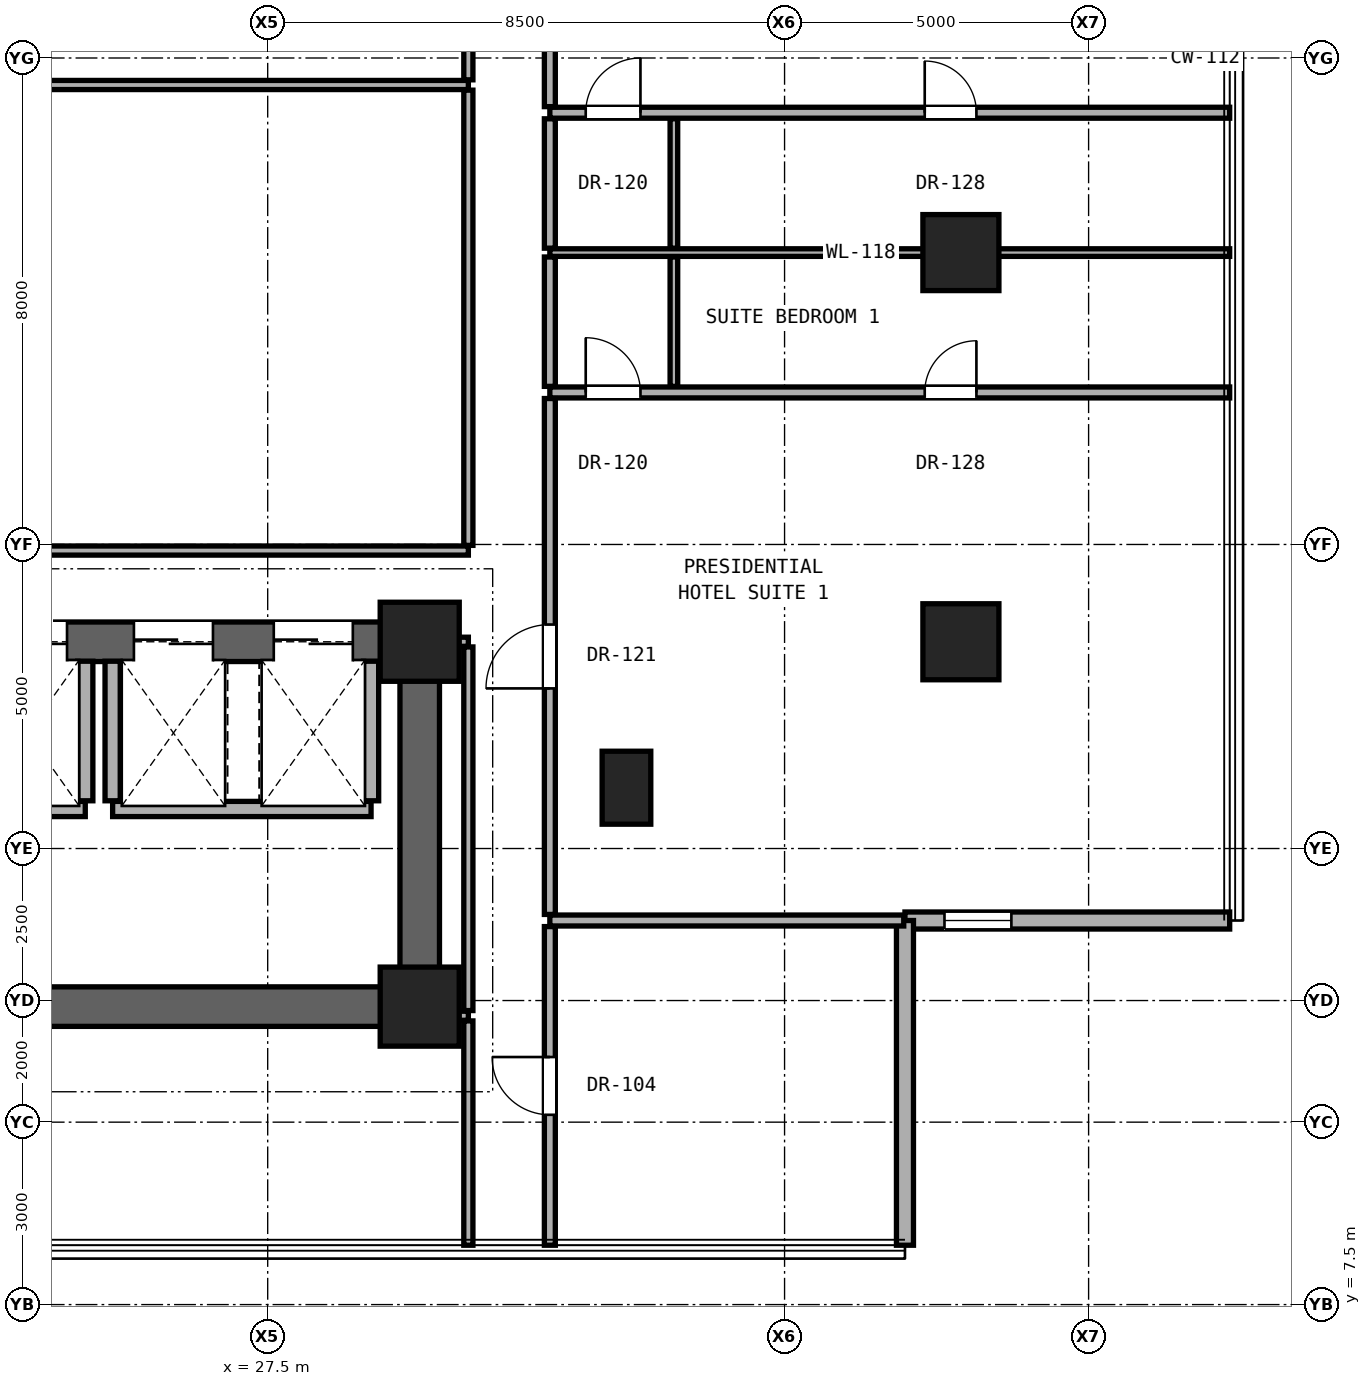
"""IFC4 building model, lengths in metres.
Left out: names, types, materials, properties, quantities, classifications, styles, units other than length and angle.
Written with IfcOpenShell. Run it as: python <this file> out.ifc"""

import sys

from ifc_helpers import new_model, si_unit, direction, frame, frame_2d, origin, origin_2d, place, context, subcontext, project, spatial, rectangle, hollow_rectangle, extrude, element, fill, save


model = new_model("IFC4")
c1 = context("Model", 3, precision=1e-05, world=origin(), true_north=direction((0.0, 1.0)))
c2 = subcontext(c1, "Body", "Model", "MODEL_VIEW")
j1 = project(units=[si_unit("LENGTHUNIT", "METRE"), si_unit("PLANEANGLEUNIT", "RADIAN")], contexts=[c1])
p1 = place(None, origin())
s1 = spatial("IfcSite", under=j1, at=p1, CompositionType="ELEMENT")
p2 = place(p1, origin())
s2 = spatial("IfcBuilding", under=s1, at=p2, CompositionType="ELEMENT")
p3 = place(p2, frame((0.0, 0.0, 78.5)))
s3 = spatial("IfcBuildingStorey", under=s2, at=p3, CompositionType="ELEMENT", Elevation=78.5)
for number, where, z_axis, x_axis in (
    (1, (30.0, 12.4, 0.0), (0.0, 0.0, 1.0), (1.0, 0.0, 0.0)),
    (2, (30.0, 18.4, 0.0), (0.0, 0.0, 1.0), (1.0, 0.0, 0.0)),
):
    element("IfcColumn", number, at=place(p3, frame(where, z_axis=z_axis, x_axis=x_axis)), inside=s3, PredefinedType="COLUMN", context=c2, shape_type="SweptSolid", body=[
        extrude(rectangle(XDim=1.3, YDim=1.3, at=origin_2d()), origin(), (0.0, 0.0, 1.0), 3.3),
    ])
for number, where, z_axis, x_axis in (
    (3, (38.9, 18.4, 0.0), (0.0, 0.0, 1.0), (1.0, 0.0, 0.0)),
    (4, (38.9, 24.8, 0.0), (0.0, 0.0, 1.0), (1.0, 0.0, 0.0)),
):
    element("IfcColumn", number, at=place(p3, frame(where, z_axis=z_axis, x_axis=x_axis)), inside=s3, PredefinedType="COLUMN", context=c2, shape_type="SweptSolid", body=[
        extrude(hollow_rectangle(XDim=1.25, YDim=1.25, WallThickness=0.07, at=origin_2d()), origin(), (0.0, 0.0, 1.0), 3.3),
    ])
p4 = place(p3, frame((33.4, 16.0, 0.0), z_axis=(0.0, 0.0, 1.0), x_axis=(1.0, 0.0, 0.0)))
e5 = element("IfcColumn", 5, at=p4, inside=s3, PredefinedType="PILASTER", context=c2, shape_type="SweptSolid", body=[
    extrude(rectangle(XDim=0.8, YDim=1.2, at=origin_2d()), origin(), (0.0, 0.0, 1.0), 3.3),
])
p5 = place(p3, frame((11.0, 12.4, 0.0), z_axis=(0.0, 0.0, 1.0), x_axis=(1.0, 0.0, 0.0)))
e6 = element("IfcWall", 6, at=p5, inside=s3, PredefinedType="SHEAR", context=c2, shape_type="SweptSolid", body=[
    extrude(rectangle(XDim=19.0, YDim=0.65, at=frame_2d((9.5, 0.0))), origin(), (0.0, 0.0, 1.0), 2.94),
])
p6 = place(p3, frame((30.0, 12.4, 0.0), z_axis=(0.0, 0.0, 1.0), x_axis=(0.0, 1.0, 0.0)))
e7 = element("IfcWall", 7, at=p6, inside=s3, PredefinedType="SHEAR", context=c2, shape_type="SweptSolid", body=[
    extrude(rectangle(XDim=6.0, YDim=0.65, at=frame_2d((3.0, 0.0))), origin(), (0.0, 0.0, 1.0), 2.94),
])
p7 = place(p3, frame((11.0, 18.4, 0.0), z_axis=(0.0, 0.0, 1.0), x_axis=(1.0, 0.0, 0.0)))
e8 = element("IfcWall", 8, at=p7, inside=s3, PredefinedType="SHEAR", context=c2, shape_type="SweptSolid", body=[
    extrude(rectangle(XDim=19.0, YDim=0.65, at=frame_2d((9.5, 0.0))), origin(), (0.0, 0.0, 1.0), 2.94),
])
p8 = place(p7, frame((4.175, 0.0, 0.0)))
e9 = element("IfcOpeningElement", 9, at=p8, cuts=e8, PredefinedType="OPENING", context=c2, shape_type="SweptSolid", body=[
    extrude(rectangle(XDim=1.2, YDim=2.25, at=frame_2d((0.6, 1.125))), frame((0.0, 0.335, 0.0), z_axis=(0.0, -1.0, 0.0), x_axis=(1.0, 0.0, 0.0)), (0.0, 0.0, 1.0), 0.67),
])
p9 = place(p7, frame((9.6, 0.0, 0.0)))
e10 = element("IfcOpeningElement", 10, at=p9, cuts=e8, PredefinedType="OPENING", context=c2, shape_type="SweptSolid", body=[
    extrude(rectangle(XDim=1.3, YDim=2.3, at=frame_2d((0.65, 1.15))), frame((0.0, 0.335, 0.0), z_axis=(0.0, -1.0, 0.0), x_axis=(1.0, 0.0, 0.0)), (0.0, 0.0, 1.0), 0.67),
])
p10 = place(p7, frame((11.9, 0.0, 0.0)))
e11 = element("IfcOpeningElement", 11, at=p10, cuts=e8, PredefinedType="OPENING", context=c2, shape_type="SweptSolid", body=[
    extrude(rectangle(XDim=1.3, YDim=2.3, at=frame_2d((0.65, 1.15))), frame((0.0, 0.335, 0.0), z_axis=(0.0, -1.0, 0.0), x_axis=(1.0, 0.0, 0.0)), (0.0, 0.0, 1.0), 0.67),
])
p11 = place(p7, frame((14.3, 0.0, 0.0)))
e12 = element("IfcOpeningElement", 12, at=p11, cuts=e8, PredefinedType="OPENING", context=c2, shape_type="SweptSolid", body=[
    extrude(rectangle(XDim=1.3, YDim=2.3, at=frame_2d((0.65, 1.15))), frame((0.0, 0.335, 0.0), z_axis=(0.0, -1.0, 0.0), x_axis=(1.0, 0.0, 0.0)), (0.0, 0.0, 1.0), 0.67),
])
p12 = place(p7, frame((16.6, 0.0, 0.0)))
e13 = element("IfcOpeningElement", 13, at=p12, cuts=e8, PredefinedType="OPENING", context=c2, shape_type="SweptSolid", body=[
    extrude(rectangle(XDim=1.3, YDim=2.3, at=frame_2d((0.65, 1.15))), frame((0.0, 0.335, 0.0), z_axis=(0.0, -1.0, 0.0), x_axis=(1.0, 0.0, 0.0)), (0.0, 0.0, 1.0), 0.67),
])
p13 = place(p3, frame((37.98, 13.816, 0.0), z_axis=(0.0, 0.0, 1.0), x_axis=(1.0, 0.0, 0.0)))
e14 = element("IfcWall", 14, at=p13, inside=s3, PredefinedType="SOLIDWALL", context=c2, shape_type="SweptSolid", body=[
    extrude(rectangle(XDim=5.34, YDim=0.28, at=frame_2d((2.67, 0.0))), origin(), (0.0, 0.0, 1.0), 2.56),
])
p14 = place(p13, frame((0.65, 0.0, 0.41)))
e15 = element("IfcOpeningElement", 15, at=p14, cuts=e14, PredefinedType="OPENING", context=c2, shape_type="SweptSolid", body=[
    extrude(rectangle(XDim=1.1, YDim=2.0, at=frame_2d((0.55, 1.0))), frame((0.0, 0.15, 0.0), z_axis=(0.0, -1.0, 0.0), x_axis=(1.0, 0.0, 0.0)), (0.0, 0.0, 1.0), 0.3),
])
p15 = place(p3, frame((37.98, 8.476, 0.0), z_axis=(0.0, 0.0, 1.0), x_axis=(0.0, 1.0, 0.0)))
e16 = element("IfcWall", 16, at=p15, inside=s3, PredefinedType="SOLIDWALL", context=c2, shape_type="SweptSolid", body=[
    extrude(rectangle(XDim=5.34, YDim=0.28, at=frame_2d((2.67, 0.0))), origin(), (0.0, 0.0, 1.0), 2.56),
])
p16 = place(p3, frame((30.32, 12.25, 0.0), z_axis=(0.0, 0.0, 1.0), x_axis=(1.0, 0.0, 0.0)))
e17 = element("IfcWall", 17, at=p16, inside=s3, PredefinedType="PARTITIONING", context=c2, shape_type="SweptSolid", body=[
    extrude(rectangle(XDim=0.48, YDim=0.15, at=frame_2d((0.24, 0.0))), origin(), (0.0, 0.0, 1.0), 2.94),
])
p17 = place(p3, frame((32.14, 13.816, 0.0), z_axis=(0.0, 0.0, 1.0), x_axis=(1.0, 0.0, 0.0)))
e18 = element("IfcWall", 18, at=p17, inside=s3, PredefinedType="PARTITIONING", context=c2, shape_type="SweptSolid", body=[
    extrude(rectangle(XDim=5.82, YDim=0.18, at=frame_2d((2.91, 0.0))), origin(), (0.0, 0.0, 1.0), 2.94),
])
p18 = place(p3, frame((20.35, 15.65, 0.0), z_axis=(0.0, 0.0, 1.0), x_axis=(1.0, 0.0, 0.0)))
e19 = element("IfcWall", 19, at=p18, inside=s3, PredefinedType="SOLIDWALL", context=c2, shape_type="SweptSolid", body=[
    extrude(rectangle(XDim=4.15, YDim=0.25, at=frame_2d((2.075, 0.0))), origin(), (0.0, 0.0, 1.0), 2.94),
])
p19 = place(p3, frame((24.95, 15.65, 0.0), z_axis=(0.0, 0.0, 1.0), x_axis=(1.0, 0.0, 0.0)))
e20 = element("IfcWall", 20, at=p19, inside=s3, PredefinedType="SOLIDWALL", context=c2, shape_type="SweptSolid", body=[
    extrude(rectangle(XDim=4.25, YDim=0.25, at=frame_2d((2.125, 0.0))), origin(), (0.0, 0.0, 1.0), 2.94),
])
p20 = place(p3, frame((30.32, 18.4, 0.0), z_axis=(0.0, 0.0, 1.0), x_axis=(1.0, 0.0, 0.0)))
e21 = element("IfcWall", 21, at=p20, inside=s3, PredefinedType="PARTITIONING", context=c2, shape_type="SweptSolid", body=[
    extrude(rectangle(XDim=0.48, YDim=0.15, at=frame_2d((0.24, 0.0))), origin(), (0.0, 0.0, 1.0), 2.316),
])
p21 = place(p3, frame((10.2, 19.9, 0.0), z_axis=(0.0, 0.0, 1.0), x_axis=(1.0, 0.0, 0.0)))
e22 = element("IfcWall", 22, at=p21, inside=s3, PredefinedType="PARTITIONING", context=c2, shape_type="SweptSolid", body=[
    extrude(rectangle(XDim=20.6, YDim=0.15, at=frame_2d((10.3, 0.0))), origin(), (0.0, 0.0, 1.0), 2.316),
])
p22 = place(p21, frame((1.67, 0.0, 0.0)))
e23 = element("IfcOpeningElement", 23, at=p22, cuts=e22, PredefinedType="OPENING", context=c2, shape_type="SweptSolid", body=[
    extrude(rectangle(XDim=0.9, YDim=2.1, at=frame_2d((0.45, 1.05))), frame((0.0, 0.085, 0.0), z_axis=(0.0, -1.0, 0.0), x_axis=(1.0, 0.0, 0.0)), (0.0, 0.0, 1.0), 0.17),
])
p23 = place(p21, frame((3.89, 0.0, 0.0)))
e24 = element("IfcOpeningElement", 24, at=p23, cuts=e22, PredefinedType="OPENING", context=c2, shape_type="SweptSolid", body=[
    extrude(rectangle(XDim=0.95, YDim=2.15, at=frame_2d((0.475, 1.075))), frame((0.0, 0.085, 0.0), z_axis=(0.0, -1.0, 0.0), x_axis=(1.0, 0.0, 0.0)), (0.0, 0.0, 1.0), 0.17),
])
p24 = place(p21, frame((12.62, 0.0, 0.0)))
e25 = element("IfcOpeningElement", 25, at=p24, cuts=e22, PredefinedType="OPENING", context=c2, shape_type="SweptSolid", body=[
    extrude(rectangle(XDim=1.05, YDim=2.2, at=frame_2d((0.525, 1.1))), frame((0.0, 0.085, 0.0), z_axis=(0.0, -1.0, 0.0), x_axis=(1.0, 0.0, 0.0)), (0.0, 0.0, 1.0), 0.17),
])
p25 = place(p3, frame((32.14, 22.5, 0.0), z_axis=(0.0, 0.0, 1.0), x_axis=(1.0, 0.0, 0.0)))
e26 = element("IfcWall", 26, at=p25, inside=s3, PredefinedType="PARTITIONING", context=c2, shape_type="SweptSolid", body=[
    extrude(rectangle(XDim=11.18, YDim=0.18, at=frame_2d((5.59, 0.0))), origin(), (0.0, 0.0, 1.0), 2.159),
])
p26 = place(p25, frame((6.165, 0.0, 0.0)))
e27 = element("IfcOpeningElement", 27, at=p26, cuts=e26, PredefinedType="OPENING", context=c2, shape_type="SweptSolid", body=[
    extrude(rectangle(XDim=0.85, YDim=2.01, at=frame_2d((0.425, 1.005))), frame((0.0, 0.1, 0.0), z_axis=(0.0, -1.0, 0.0), x_axis=(1.0, 0.0, 0.0)), (0.0, 0.0, 1.0), 0.2),
])
p27 = place(p25, frame((0.59, 0.0, 0.0)))
e28 = element("IfcOpeningElement", 28, at=p27, cuts=e26, PredefinedType="OPENING", context=c2, shape_type="SweptSolid", body=[
    extrude(rectangle(XDim=0.9, YDim=2.1, at=frame_2d((0.45, 1.05))), frame((0.0, 0.1, 0.0), z_axis=(0.0, -1.0, 0.0), x_axis=(1.0, 0.0, 0.0)), (0.0, 0.0, 1.0), 0.2),
])
p28 = place(p3, frame((32.14, 24.8, 0.0), z_axis=(0.0, 0.0, 1.0), x_axis=(1.0, 0.0, 0.0)))
e29 = element("IfcWall", 29, at=p28, inside=s3, PredefinedType="PARTITIONING", context=c2, shape_type="SweptSolid", body=[
    extrude(rectangle(XDim=11.18, YDim=0.125, at=frame_2d((5.59, 0.0))), origin(), (0.0, 0.0, 1.0), 2.159),
])
p29 = place(p3, frame((32.14, 27.1, 0.0), z_axis=(0.0, 0.0, 1.0), x_axis=(1.0, 0.0, 0.0)))
e30 = element("IfcWall", 30, at=p29, inside=s3, PredefinedType="PARTITIONING", context=c2, shape_type="SweptSolid", body=[
    extrude(rectangle(XDim=11.18, YDim=0.18, at=frame_2d((5.59, 0.0))), origin(), (0.0, 0.0, 1.0), 2.159),
])
p30 = place(p29, frame((6.165, 0.0, 0.0)))
e31 = element("IfcOpeningElement", 31, at=p30, cuts=e30, PredefinedType="OPENING", context=c2, shape_type="SweptSolid", body=[
    extrude(rectangle(XDim=0.85, YDim=2.01, at=frame_2d((0.425, 1.005))), frame((0.0, 0.1, 0.0), z_axis=(0.0, -1.0, 0.0), x_axis=(1.0, 0.0, 0.0)), (0.0, 0.0, 1.0), 0.2),
])
p31 = place(p29, frame((0.59, 0.0, 0.0)))
e32 = element("IfcOpeningElement", 32, at=p31, cuts=e30, PredefinedType="OPENING", context=c2, shape_type="SweptSolid", body=[
    extrude(rectangle(XDim=0.9, YDim=2.1, at=frame_2d((0.45, 1.05))), frame((0.0, 0.1, 0.0), z_axis=(0.0, -1.0, 0.0), x_axis=(1.0, 0.0, 0.0)), (0.0, 0.0, 1.0), 0.2),
])
p32 = place(p3, frame((15.93, 27.556, 0.0), z_axis=(0.0, 0.0, 1.0), x_axis=(1.0, 0.0, 0.0)))
e33 = element("IfcWall", 33, at=p32, inside=s3, PredefinedType="PARTITIONING", context=c2, shape_type="SweptSolid", body=[
    extrude(rectangle(XDim=14.87, YDim=0.15, at=frame_2d((7.435, 0.0))), origin(), (0.0, 0.0, 1.0), 2.316),
])
for number, where, z_axis, x_axis in (
    (34, (24.5, 15.785, 0.0), (0.0, 0.0, 1.0), (0.0, 1.0, 0.0)),
    (35, (24.95, 15.785, 0.0), (0.0, 0.0, 1.0), (0.0, 1.0, 0.0)),
    (36, (29.2, 15.785, 0.0), (0.0, 0.0, 1.0), (0.0, 1.0, 0.0)),
):
    element("IfcWall", number, at=place(p3, frame(where, z_axis=z_axis, x_axis=x_axis)), inside=s3, PredefinedType="SOLIDWALL", context=c2, shape_type="SweptSolid", body=[
        extrude(rectangle(XDim=2.295, YDim=0.25, at=frame_2d((1.147, 0.0))), origin(), (0.0, 0.0, 1.0), 2.94),
    ])
p33 = place(p3, frame((30.8, 8.476, 0.0), z_axis=(0.0, 0.0, 1.0), x_axis=(0.0, 1.0, 0.0)))
e37 = element("IfcWall", 37, at=p33, inside=s3, PredefinedType="PARTITIONING", context=c2, shape_type="SweptSolid", body=[
    extrude(rectangle(XDim=3.689, YDim=0.15, at=frame_2d((1.844, 0.0))), origin(), (0.0, 0.0, 1.0), 2.94),
])
p34 = place(p3, frame((30.8, 12.335, 0.0), z_axis=(0.0, 0.0, 1.0), x_axis=(0.0, 1.0, 0.0)))
e38 = element("IfcWall", 38, at=p34, inside=s3, PredefinedType="PARTITIONING", context=c2, shape_type="SweptSolid", body=[
    extrude(rectangle(XDim=5.98, YDim=0.15, at=frame_2d((2.99, 0.0))), origin(), (0.0, 0.0, 1.0), 2.316),
])
p35 = place(p3, frame((30.8, 19.985, 0.0), z_axis=(0.0, 0.0, 1.0), x_axis=(0.0, 1.0, 0.0)))
e39 = element("IfcWall", 39, at=p35, inside=s3, PredefinedType="PARTITIONING", context=c2, shape_type="SweptSolid", body=[
    extrude(rectangle(XDim=7.486, YDim=0.15, at=frame_2d((3.743, 0.0))), origin(), (0.0, 0.0, 1.0), 2.316),
])
p36 = place(p3, frame((30.8, 27.641, 0.0), z_axis=(0.0, 0.0, 1.0), x_axis=(0.0, 1.0, 0.0)))
e40 = element("IfcWall", 40, at=p36, inside=s3, PredefinedType="PARTITIONING", context=c2, shape_type="SweptSolid", body=[
    extrude(rectangle(XDim=5.374, YDim=0.15, at=frame_2d((2.687, 0.0))), origin(), (0.0, 0.0, 1.0), 2.316),
])
p37 = place(p3, frame((32.14, 8.476, 0.0), z_axis=(0.0, 0.0, 1.0), x_axis=(0.0, 1.0, 0.0)))
e41 = element("IfcWall", 41, at=p37, inside=s3, PredefinedType="PARTITIONING", context=c2, shape_type="SweptSolid", body=[
    extrude(rectangle(XDim=5.24, YDim=0.18, at=frame_2d((2.62, 0.0))), origin(), (0.0, 0.0, 1.0), 2.94),
])
p38 = place(p37, frame((2.145, 0.0, 0.0)))
e42 = element("IfcOpeningElement", 42, at=p38, cuts=e41, PredefinedType="OPENING", context=c2, shape_type="SweptSolid", body=[
    extrude(rectangle(XDim=0.95, YDim=2.15, at=frame_2d((0.475, 1.075))), frame((0.0, 0.1, 0.0), z_axis=(0.0, -1.0, 0.0), x_axis=(1.0, 0.0, 0.0)), (0.0, 0.0, 1.0), 0.2),
])
p39 = place(p3, frame((32.14, 13.916, 0.0), z_axis=(0.0, 0.0, 1.0), x_axis=(0.0, 1.0, 0.0)))
e43 = element("IfcWall", 43, at=p39, inside=s3, PredefinedType="PARTITIONING", context=c2, shape_type="SweptSolid", body=[
    extrude(rectangle(XDim=8.484, YDim=0.18, at=frame_2d((4.242, 0.0))), origin(), (0.0, 0.0, 1.0), 2.316),
])
p40 = place(p39, frame((3.717, 0.0, 0.0)))
e44 = element("IfcOpeningElement", 44, at=p40, cuts=e43, PredefinedType="OPENING", context=c2, shape_type="SweptSolid", body=[
    extrude(rectangle(XDim=1.05, YDim=2.2, at=frame_2d((0.525, 1.1))), frame((0.0, 0.1, 0.0), z_axis=(0.0, -1.0, 0.0), x_axis=(1.0, 0.0, 0.0)), (0.0, 0.0, 1.0), 0.2),
])
for number, where, z_axis, x_axis in (
    (45, (32.14, 22.6, 0.0), (0.0, 0.0, 1.0), (0.0, 1.0, 0.0)),
    (46, (32.14, 24.873, 0.0), (0.0, 0.0, 1.0), (0.0, 1.0, 0.0)),
):
    element("IfcWall", number, at=place(p3, frame(where, z_axis=z_axis, x_axis=x_axis)), inside=s3, PredefinedType="PARTITIONING", context=c2, shape_type="SweptSolid", body=[
        extrude(rectangle(XDim=2.127, YDim=0.18, at=frame_2d((1.064, 0.0))), origin(), (0.0, 0.0, 1.0), 2.316),
    ])
p41 = place(p3, frame((32.14, 27.2, 0.0), z_axis=(0.0, 0.0, 1.0), x_axis=(0.0, 1.0, 0.0)))
e47 = element("IfcWall", 47, at=p41, inside=s3, PredefinedType="PARTITIONING", context=c2, shape_type="SweptSolid", body=[
    extrude(rectangle(XDim=14.884, YDim=0.18, at=frame_2d((7.442, 0.0))), origin(), (0.0, 0.0, 1.0), 2.316),
])
p42 = place(p41, frame((6.917, 0.0, 0.0)))
e48 = element("IfcOpeningElement", 48, at=p42, cuts=e47, PredefinedType="OPENING", context=c2, shape_type="SweptSolid", body=[
    extrude(rectangle(XDim=1.05, YDim=2.2, at=frame_2d((0.525, 1.1))), frame((0.0, 0.1, 0.0), z_axis=(0.0, -1.0, 0.0), x_axis=(1.0, 0.0, 0.0)), (0.0, 0.0, 1.0), 0.2),
])
for number, where, z_axis, x_axis in (
    (49, (34.18, 22.6, 0.0), (0.0, 0.0, 1.0), (0.0, 1.0, 0.0)),
    (50, (34.18, 24.873, 0.0), (0.0, 0.0, 1.0), (0.0, 1.0, 0.0)),
):
    element("IfcWall", number, at=place(p3, frame(where, z_axis=z_axis, x_axis=x_axis)), inside=s3, PredefinedType="PARTITIONING", context=c2, shape_type="SweptSolid", body=[
        extrude(rectangle(XDim=2.127, YDim=0.125, at=frame_2d((1.064, 0.0))), origin(), (0.0, 0.0, 1.0), 2.316),
    ])
p43 = place(p14, origin())
e51 = element("IfcWindow", 51, at=p43, inside=s3, PartitioningType="SINGLE_PANEL", PredefinedType="WINDOW", context=c2, shape_type="SweptSolid", body=[
    extrude(rectangle(XDim=1.1, YDim=2.0, at=frame_2d((0.55, 1.0))), frame((0.0, 0.03, 0.0), z_axis=(0.0, -1.0, 0.0), x_axis=(1.0, 0.0, 0.0)), (0.0, 0.0, 1.0), 0.06),
])
fill(e15, e51)
p44 = place(p40, origin())
e52 = element("IfcDoor", 52, at=p44, inside=s3, OperationType="SINGLE_SWING_LEFT", PredefinedType="DOOR", context=c2, shape_type="SweptSolid", body=[
    extrude(rectangle(XDim=1.05, YDim=2.2, at=frame_2d((0.525, 1.1))), frame((0.0, 0.025, 0.0), z_axis=(0.0, -1.0, 0.0), x_axis=(1.0, 0.0, 0.0)), (0.0, 0.0, 1.0), 0.05),
])
fill(e44, e52)
p45 = place(p26, origin())
e53 = element("IfcDoor", 53, at=p45, inside=s3, OperationType="SINGLE_SWING_RIGHT", PredefinedType="DOOR", context=c2, shape_type="SweptSolid", body=[
    extrude(rectangle(XDim=0.85, YDim=2.01, at=frame_2d((0.425, 1.005))), frame((0.0, 0.025, 0.0), z_axis=(0.0, -1.0, 0.0), x_axis=(1.0, 0.0, 0.0)), (0.0, 0.0, 1.0), 0.05),
])
fill(e27, e53)
p46 = place(p27, origin())
e54 = element("IfcDoor", 54, at=p46, inside=s3, OperationType="SINGLE_SWING_LEFT", PredefinedType="DOOR", context=c2, shape_type="SweptSolid", body=[
    extrude(rectangle(XDim=0.9, YDim=2.1, at=frame_2d((0.45, 1.05))), frame((0.0, 0.025, 0.0), z_axis=(0.0, -1.0, 0.0), x_axis=(1.0, 0.0, 0.0)), (0.0, 0.0, 1.0), 0.05),
])
fill(e28, e54)
p47 = place(p30, origin())
e55 = element("IfcDoor", 55, at=p47, inside=s3, OperationType="SINGLE_SWING_LEFT", PredefinedType="DOOR", context=c2, shape_type="SweptSolid", body=[
    extrude(rectangle(XDim=0.85, YDim=2.01, at=frame_2d((0.425, 1.005))), frame((0.0, 0.025, 0.0), z_axis=(0.0, -1.0, 0.0), x_axis=(1.0, 0.0, 0.0)), (0.0, 0.0, 1.0), 0.05),
])
fill(e31, e55)
p48 = place(p31, origin())
e56 = element("IfcDoor", 56, at=p48, inside=s3, OperationType="SINGLE_SWING_RIGHT", PredefinedType="DOOR", context=c2, shape_type="SweptSolid", body=[
    extrude(rectangle(XDim=0.9, YDim=2.1, at=frame_2d((0.45, 1.05))), frame((0.0, 0.025, 0.0), z_axis=(0.0, -1.0, 0.0), x_axis=(1.0, 0.0, 0.0)), (0.0, 0.0, 1.0), 0.05),
])
fill(e32, e56)
p49 = place(p38, origin())
e57 = element("IfcDoor", 57, at=p49, inside=s3, OperationType="SINGLE_SWING_RIGHT", PredefinedType="DOOR", context=c2, shape_type="SweptSolid", body=[
    extrude(rectangle(XDim=0.95, YDim=2.15, at=frame_2d((0.475, 1.075))), frame((0.0, 0.025, 0.0), z_axis=(0.0, -1.0, 0.0), x_axis=(1.0, 0.0, 0.0)), (0.0, 0.0, 1.0), 0.05),
])
fill(e42, e57)
p50 = place(p10, origin())
e58 = element("IfcDoor", 58, at=p50, inside=s3, OperationType="DOUBLE_DOOR_SLIDING", PredefinedType="DOOR", context=c2, shape_type="SweptSolid", body=[
    extrude(rectangle(XDim=1.3, YDim=2.3, at=frame_2d((0.65, 1.15))), frame((0.0, 0.025, 0.0), z_axis=(0.0, -1.0, 0.0), x_axis=(1.0, 0.0, 0.0)), (0.0, 0.0, 1.0), 0.05),
])
fill(e11, e58)
p51 = place(p11, origin())
e59 = element("IfcDoor", 59, at=p51, inside=s3, OperationType="DOUBLE_DOOR_SLIDING", PredefinedType="DOOR", context=c2, shape_type="SweptSolid", body=[
    extrude(rectangle(XDim=1.3, YDim=2.3, at=frame_2d((0.65, 1.15))), frame((0.0, 0.025, 0.0), z_axis=(0.0, -1.0, 0.0), x_axis=(1.0, 0.0, 0.0)), (0.0, 0.0, 1.0), 0.05),
])
fill(e12, e59)
p52 = place(p12, origin())
e60 = element("IfcDoor", 60, at=p52, inside=s3, OperationType="DOUBLE_DOOR_SLIDING", PredefinedType="DOOR", context=c2, shape_type="SweptSolid", body=[
    extrude(rectangle(XDim=1.3, YDim=2.3, at=frame_2d((0.65, 1.15))), frame((0.0, 0.025, 0.0), z_axis=(0.0, -1.0, 0.0), x_axis=(1.0, 0.0, 0.0)), (0.0, 0.0, 1.0), 0.05),
])
fill(e13, e60)
save(model, sys.argv[1])
